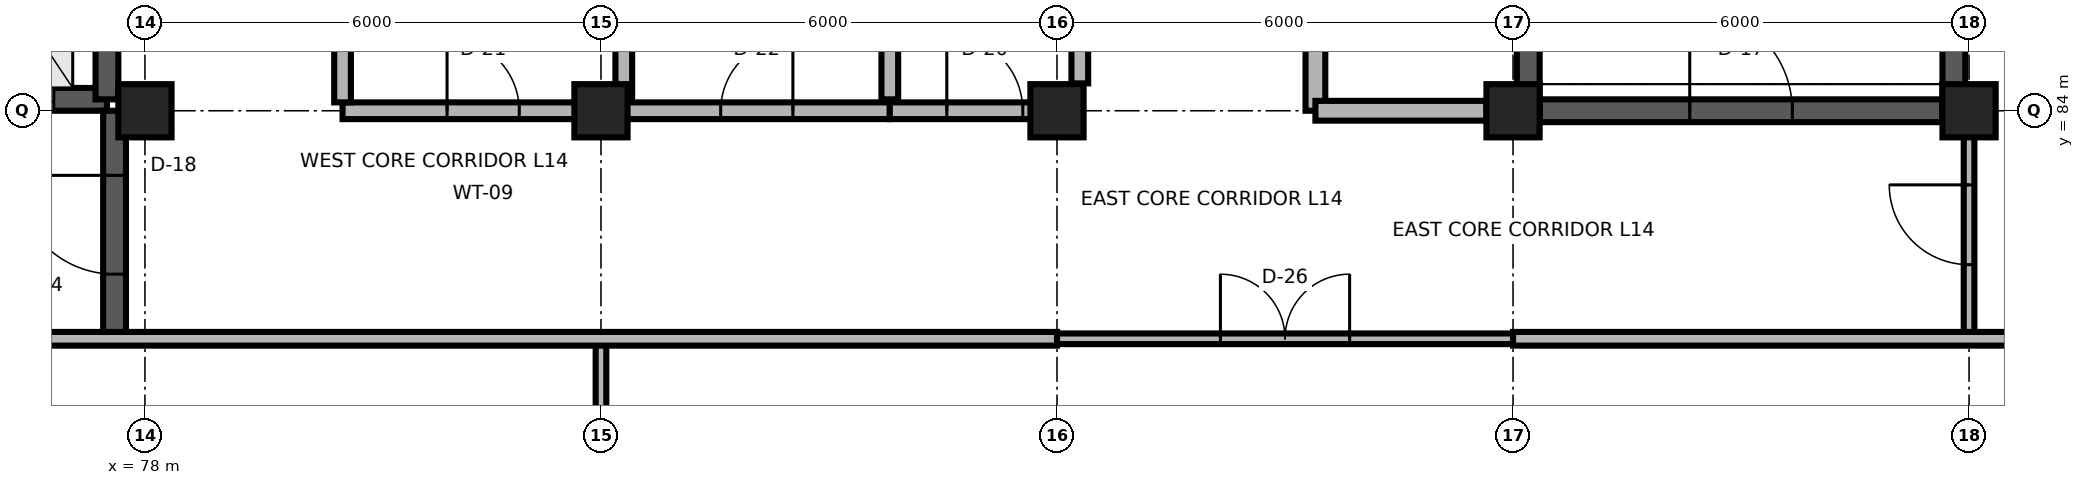
"""IFC4 building model, lengths in metres.
Left out: names, types, materials, properties, quantities, classifications, styles, units other than length and angle.
Written with IfcOpenShell. Run it as: python <this file> out.ifc"""

import sys

from ifc_helpers import new_model, si_unit, direction, frame, frame_2d, origin, origin_2d, place, context, subcontext, project, spatial, rectangle, extrude, element, fill, save


model = new_model("IFC4")
c1 = context("Model", 3, precision=1e-05, world=origin(), true_north=direction((0.0, 1.0)))
c2 = subcontext(c1, "Body", "Model", "MODEL_VIEW")
j1 = project(units=[si_unit("LENGTHUNIT", "METRE"), si_unit("PLANEANGLEUNIT", "RADIAN")], contexts=[c1])
p1 = place(None, origin())
s1 = spatial("IfcSite", under=j1, at=p1, CompositionType="ELEMENT")
p2 = place(p1, origin())
s2 = spatial("IfcBuilding", under=s1, at=p2, CompositionType="ELEMENT")
p3 = place(p2, frame((0.0, 0.0, 56.1)))
s3 = spatial("IfcBuildingStorey", under=s2, at=p3, CompositionType="ELEMENT", Elevation=56.1)
for number, where, z_axis, x_axis in (
    (1, (78.0, 84.0, 0.0), (0.0, 0.0, 1.0), (1.0, 0.0, 0.0)),
    (2, (84.0, 84.0, 0.0), (0.0, 0.0, 1.0), (1.0, 0.0, 0.0)),
    (3, (90.0, 84.0, 0.0), (0.0, 0.0, 1.0), (1.0, 0.0, 0.0)),
    (4, (96.0, 84.0, 0.0), (0.0, 0.0, 1.0), (1.0, 0.0, 0.0)),
    (5, (102.0, 84.0, 0.0), (0.0, 0.0, 1.0), (1.0, 0.0, 0.0)),
):
    element("IfcColumn", number, at=place(p3, frame(where, z_axis=z_axis, x_axis=x_axis)), inside=s3, PredefinedType="COLUMN", context=c2, shape_type="SweptSolid", body=[
        extrude(rectangle(XDim=0.7, YDim=0.7, at=origin_2d()), origin(), (0.0, 0.0, 1.0), 3.9),
    ])
p4 = place(p3, frame((96.35, 84.0, 0.0), z_axis=(0.0, 0.0, 1.0), x_axis=(1.0, 0.0, 0.0)))
e6 = element("IfcWall", 6, at=p4, inside=s3, PredefinedType="SHEAR", context=c2, shape_type="SweptSolid", body=[
    extrude(rectangle(XDim=5.3, YDim=0.3, at=frame_2d((2.65, 0.0))), origin(), (0.0, 0.0, 1.0), 3.66),
])
p5 = place(p4, frame((1.975, 0.0, 0.0)))
e7 = element("IfcOpeningElement", 7, at=p5, cuts=e6, PredefinedType="OPENING", context=c2, shape_type="SweptSolid", body=[
    extrude(rectangle(XDim=1.35, YDim=2.2, at=frame_2d((0.675, 1.1))), frame((0.0, 0.165, 0.0), z_axis=(0.0, -1.0, 0.0), x_axis=(1.0, 0.0, 0.0)), (0.0, 0.0, 1.0), 0.33),
])
for number, where, z_axis, x_axis in (
    (8, (96.2, 84.0, 0.0), (0.0, 0.0, 1.0), (0.0, 1.0, 0.0)),
    (9, (101.8, 84.0, 0.0), (0.0, 0.0, 1.0), (0.0, 1.0, 0.0)),
):
    element("IfcWall", number, at=place(p3, frame(where, z_axis=z_axis, x_axis=x_axis)), inside=s3, PredefinedType="SHEAR", context=c2, shape_type="SweptSolid", body=[
        extrude(rectangle(XDim=11.8, YDim=0.3, at=frame_2d((5.9, 0.0))), origin(), (0.0, 0.0, 1.0), 3.74),
    ])
p6 = place(p3, frame((75.0, 84.15, 0.0), z_axis=(0.0, 0.0, 1.0), x_axis=(1.0, 0.0, 0.0)))
e10 = element("IfcWall", 10, at=p6, inside=s3, PredefinedType="SHEAR", context=c2, shape_type="SweptSolid", body=[
    extrude(rectangle(XDim=2.5, YDim=0.3, at=frame_2d((1.25, 0.0))), origin(), (0.0, 0.0, 1.0), 3.74),
])
p7 = place(p6, frame((0.7, 0.0, 0.0)))
e11 = element("IfcOpeningElement", 11, at=p7, cuts=e10, PredefinedType="OPENING", context=c2, shape_type="SweptSolid", body=[
    extrude(rectangle(XDim=1.1, YDim=2.1, at=frame_2d((0.55, 1.05))), frame((0.0, 0.165, 0.0), z_axis=(0.0, -1.0, 0.0), x_axis=(1.0, 0.0, 0.0)), (0.0, 0.0, 1.0), 0.33),
])
p8 = place(p3, frame((77.5, 84.15, 0.0), z_axis=(0.0, 0.0, 1.0), x_axis=(0.0, 1.0, 0.0)))
e12 = element("IfcWall", 12, at=p8, inside=s3, PredefinedType="SHEAR", context=c2, shape_type="SweptSolid", body=[
    extrude(rectangle(XDim=3.4, YDim=0.3, at=frame_2d((1.7, 0.0))), origin(), (0.0, 0.0, 1.0), 3.74),
])
p9 = place(p3, frame((93.4, 84.0, 0.0), z_axis=(0.0, 0.0, 1.0), x_axis=(0.0, 1.0, 0.0)))
e13 = element("IfcWall", 13, at=p9, inside=s3, PredefinedType="PARTITIONING", context=c2, shape_type="SweptSolid", body=[
    extrude(rectangle(XDim=11.96, YDim=0.26, at=frame_2d((5.98, 0.0))), origin(), (0.0, 0.0, 1.0), 3.74),
])
p10 = place(p9, frame((3.425, 0.0, 0.0)))
e14 = element("IfcOpeningElement", 14, at=p10, cuts=e13, PredefinedType="OPENING", context=c2, shape_type="SweptSolid", body=[
    extrude(rectangle(XDim=1.15, YDim=2.2, at=frame_2d((0.575, 1.1))), frame((0.0, 0.145, 0.0), z_axis=(0.0, -1.0, 0.0), x_axis=(1.0, 0.0, 0.0)), (0.0, 0.0, 1.0), 0.29),
])
p11 = place(p3, frame((93.4, 84.0, 0.0), z_axis=(0.0, 0.0, 1.0), x_axis=(1.0, 0.0, 0.0)))
e15 = element("IfcWall", 15, at=p11, inside=s3, PredefinedType="PARTITIONING", context=c2, shape_type="SweptSolid", body=[
    extrude(rectangle(XDim=2.25, YDim=0.26, at=frame_2d((1.125, 0.0))), origin(), (0.0, 0.0, 1.0), 3.449),
])
p12 = place(p3, frame((77.6, 81.0, 0.0), z_axis=(0.0, 0.0, 1.0), x_axis=(0.0, 1.0, 0.0)))
e16 = element("IfcWall", 16, at=p12, inside=s3, PredefinedType="SHEAR", context=c2, shape_type="SweptSolid", body=[
    extrude(rectangle(XDim=3.0, YDim=0.3, at=frame_2d((1.5, 0.0))), origin(), (0.0, 0.0, 1.0), 3.74),
])
p13 = place(p12, frame((0.85, 0.0, 0.0)))
e17 = element("IfcOpeningElement", 17, at=p13, cuts=e16, PredefinedType="OPENING", context=c2, shape_type="SweptSolid", body=[
    extrude(rectangle(XDim=1.3, YDim=2.2, at=frame_2d((0.65, 1.1))), frame((0.0, 0.165, 0.0), z_axis=(0.0, -1.0, 0.0), x_axis=(1.0, 0.0, 0.0)), (0.0, 0.0, 1.0), 0.33),
])
p14 = place(p3, frame((80.6, 84.0, 0.0), z_axis=(0.0, 0.0, 1.0), x_axis=(1.0, 0.0, 0.0)))
e18 = element("IfcWall", 18, at=p14, inside=s3, PredefinedType="PARTITIONING", context=c2, shape_type="SweptSolid", body=[
    extrude(rectangle(XDim=3.7, YDim=0.22, at=frame_2d((1.85, 0.0))), origin(), (0.0, 0.0, 1.0), 3.449),
])
p15 = place(p14, frame((1.375, 0.0, 0.0)))
e19 = element("IfcOpeningElement", 19, at=p15, cuts=e18, PredefinedType="OPENING", context=c2, shape_type="SweptSolid", body=[
    extrude(rectangle(XDim=0.95, YDim=2.15, at=frame_2d((0.475, 1.075))), frame((0.0, 0.125, 0.0), z_axis=(0.0, -1.0, 0.0), x_axis=(1.0, 0.0, 0.0)), (0.0, 0.0, 1.0), 0.25),
])
p16 = place(p3, frame((84.3, 84.0, 0.0), z_axis=(0.0, 0.0, 1.0), x_axis=(1.0, 0.0, 0.0)))
e20 = element("IfcWall", 20, at=p16, inside=s3, PredefinedType="PARTITIONING", context=c2, shape_type="SweptSolid", body=[
    extrude(rectangle(XDim=3.5, YDim=0.22, at=frame_2d((1.75, 0.0))), origin(), (0.0, 0.0, 1.0), 3.449),
])
p17 = place(p16, frame((1.275, 0.0, 0.0)))
e21 = element("IfcOpeningElement", 21, at=p17, cuts=e20, PredefinedType="OPENING", context=c2, shape_type="SweptSolid", body=[
    extrude(rectangle(XDim=0.95, YDim=2.1, at=frame_2d((0.475, 1.05))), frame((0.0, 0.125, 0.0), z_axis=(0.0, -1.0, 0.0), x_axis=(1.0, 0.0, 0.0)), (0.0, 0.0, 1.0), 0.25),
])
p18 = place(p3, frame((87.8, 84.0, 0.0), z_axis=(0.0, 0.0, 1.0), x_axis=(1.0, 0.0, 0.0)))
e22 = element("IfcWall", 22, at=p18, inside=s3, PredefinedType="PARTITIONING", context=c2, shape_type="SweptSolid", body=[
    extrude(rectangle(XDim=2.5, YDim=0.22, at=frame_2d((1.25, 0.0))), origin(), (0.0, 0.0, 1.0), 3.449),
])
p19 = place(p18, frame((0.75, 0.0, 0.0)))
e23 = element("IfcOpeningElement", 23, at=p19, cuts=e22, PredefinedType="OPENING", context=c2, shape_type="SweptSolid", body=[
    extrude(rectangle(XDim=1.0, YDim=2.15, at=frame_2d((0.5, 1.075))), frame((0.0, 0.125, 0.0), z_axis=(0.0, -1.0, 0.0), x_axis=(1.0, 0.0, 0.0)), (0.0, 0.0, 1.0), 0.25),
])
for number, where, z_axis, x_axis in (
    (24, (84.3, 84.15, 0.0), (0.0, 0.0, 1.0), (0.0, 1.0, 0.0)),
    (25, (87.8, 84.15, 0.0), (0.0, 0.0, 1.0), (0.0, 1.0, 0.0)),
):
    element("IfcWall", number, at=place(p3, frame(where, z_axis=z_axis, x_axis=x_axis)), inside=s3, PredefinedType="PARTITIONING", context=c2, shape_type="SweptSolid", body=[
        extrude(rectangle(XDim=5.0, YDim=0.22, at=frame_2d((2.5, 0.0))), origin(), (0.0, 0.0, 1.0), 3.74),
    ])
p20 = place(p3, frame((90.0, 81.0, 0.0), z_axis=(0.0, 0.0, 1.0), x_axis=(1.0, 0.0, 0.0)))
e26 = element("IfcWall", 26, at=p20, inside=s3, PredefinedType="PARTITIONING", context=c2, shape_type="SweptSolid", body=[
    extrude(rectangle(XDim=6.0, YDim=0.14, at=frame_2d((3.0, 0.0))), origin(), (0.0, 0.0, 1.0), 3.74),
])
p21 = place(p20, frame((2.15, 0.0, 0.0)))
e27 = element("IfcOpeningElement", 27, at=p21, cuts=e26, PredefinedType="OPENING", context=c2, shape_type="SweptSolid", body=[
    extrude(rectangle(XDim=1.7, YDim=2.45, at=frame_2d((0.85, 1.225))), frame((0.0, 0.085, 0.0), z_axis=(0.0, -1.0, 0.0), x_axis=(1.0, 0.0, 0.0)), (0.0, 0.0, 1.0), 0.17),
])
p22 = place(p3, frame((102.0, 81.05, 0.0), z_axis=(0.0, 0.0, 1.0), x_axis=(0.0, 1.0, 0.0)))
e28 = element("IfcWall", 28, at=p22, inside=s3, PredefinedType="PARTITIONING", context=c2, shape_type="SweptSolid", body=[
    extrude(rectangle(XDim=2.9, YDim=0.14, at=frame_2d((1.45, 0.0))), origin(), (0.0, 0.0, 1.0), 3.449),
])
p23 = place(p22, frame((0.925, 0.0, 0.0)))
e29 = element("IfcOpeningElement", 29, at=p23, cuts=e28, PredefinedType="OPENING", context=c2, shape_type="SweptSolid", body=[
    extrude(rectangle(XDim=1.05, YDim=2.25, at=frame_2d((0.525, 1.125))), frame((0.0, 0.085, 0.0), z_axis=(0.0, -1.0, 0.0), x_axis=(1.0, 0.0, 0.0)), (0.0, 0.0, 1.0), 0.17),
])
p24 = place(p3, frame((84.0, 78.35, 0.0), z_axis=(0.0, 0.0, 1.0), x_axis=(0.0, 1.0, 0.0)))
e30 = element("IfcWall", 30, at=p24, inside=s3, PredefinedType="PARTITIONING", context=c2, shape_type="SweptSolid", body=[
    extrude(rectangle(XDim=2.65, YDim=0.14, at=frame_2d((1.325, 0.0))), origin(), (0.0, 0.0, 1.0), 3.449),
])
p25 = place(p3, frame((80.6, 84.11, 0.0), z_axis=(0.0, 0.0, 1.0), x_axis=(0.0, 1.0, 0.0)))
e31 = element("IfcWall", 31, at=p25, inside=s3, PredefinedType="PARTITIONING", context=c2, shape_type="SweptSolid", body=[
    extrude(rectangle(XDim=4.98, YDim=0.22, at=frame_2d((2.49, 0.0))), origin(), (0.0, 0.0, 1.0), 3.74),
])
p26 = place(p3, frame((90.3, 84.36, 0.0), z_axis=(0.0, 0.0, 1.0), x_axis=(0.0, 1.0, 0.0)))
e32 = element("IfcWall", 32, at=p26, inside=s3, PredefinedType="PARTITIONING", context=c2, shape_type="SweptSolid", body=[
    extrude(rectangle(XDim=4.73, YDim=0.22, at=frame_2d((2.365, 0.0))), origin(), (0.0, 0.0, 1.0), 3.74),
])
p27 = place(p3, frame((72.0, 81.0, 0.0), z_axis=(0.0, 0.0, 1.0), x_axis=(1.0, 0.0, 0.0)))
e33 = element("IfcWall", 33, at=p27, inside=s3, PredefinedType="PARTITIONING", context=c2, shape_type="SweptSolid", body=[
    extrude(rectangle(XDim=18.0, YDim=0.18, at=frame_2d((9.0, 0.0))), origin(), (0.0, 0.0, 1.0), 3.74),
])
p28 = place(p3, frame((96.0, 81.0, 0.0), z_axis=(0.0, 0.0, 1.0), x_axis=(1.0, 0.0, 0.0)))
e34 = element("IfcWall", 34, at=p28, inside=s3, PredefinedType="PARTITIONING", context=c2, shape_type="SweptSolid", body=[
    extrude(rectangle(XDim=10.3, YDim=0.18, at=frame_2d((5.15, 0.0))), origin(), (0.0, 0.0, 1.0), 3.74),
])
p29 = place(p5, origin())
e35 = element("IfcDoor", 35, at=p29, inside=s3, OperationType="SINGLE_SWING_LEFT", PredefinedType="DOOR", context=c2, shape_type="SweptSolid", body=[
    extrude(rectangle(XDim=1.35, YDim=2.2, at=frame_2d((0.675, 1.1))), frame((0.0, 0.025, 0.0), z_axis=(0.0, -1.0, 0.0), x_axis=(1.0, 0.0, 0.0)), (0.0, 0.0, 1.0), 0.05),
])
fill(e7, e35)
p30 = place(p7, origin())
e36 = element("IfcDoor", 36, at=p30, inside=s3, OperationType="DOUBLE_DOOR_SLIDING", PredefinedType="DOOR", context=c2, shape_type="SweptSolid", body=[
    extrude(rectangle(XDim=1.1, YDim=2.1, at=frame_2d((0.55, 1.05))), frame((0.0, 0.025, 0.0), z_axis=(0.0, -1.0, 0.0), x_axis=(1.0, 0.0, 0.0)), (0.0, 0.0, 1.0), 0.05),
])
fill(e11, e36)
p31 = place(p13, origin())
e37 = element("IfcDoor", 37, at=p31, inside=s3, OperationType="SINGLE_SWING_RIGHT", PredefinedType="DOOR", context=c2, shape_type="SweptSolid", body=[
    extrude(rectangle(XDim=1.3, YDim=2.2, at=frame_2d((0.65, 1.1))), frame((0.0, 0.025, 0.0), z_axis=(0.0, -1.0, 0.0), x_axis=(1.0, 0.0, 0.0)), (0.0, 0.0, 1.0), 0.05),
])
fill(e17, e37)
p32 = place(p15, origin())
e38 = element("IfcDoor", 38, at=p32, inside=s3, OperationType="SINGLE_SWING_LEFT", PredefinedType="DOOR", context=c2, shape_type="SweptSolid", body=[
    extrude(rectangle(XDim=0.95, YDim=2.15, at=frame_2d((0.475, 1.075))), frame((0.0, 0.025, 0.0), z_axis=(0.0, -1.0, 0.0), x_axis=(1.0, 0.0, 0.0)), (0.0, 0.0, 1.0), 0.05),
])
fill(e19, e38)
p33 = place(p17, origin())
e39 = element("IfcDoor", 39, at=p33, inside=s3, OperationType="SINGLE_SWING_RIGHT", PredefinedType="DOOR", context=c2, shape_type="SweptSolid", body=[
    extrude(rectangle(XDim=0.95, YDim=2.1, at=frame_2d((0.475, 1.05))), frame((0.0, 0.025, 0.0), z_axis=(0.0, -1.0, 0.0), x_axis=(1.0, 0.0, 0.0)), (0.0, 0.0, 1.0), 0.05),
])
fill(e21, e39)
p34 = place(p19, origin())
e40 = element("IfcDoor", 40, at=p34, inside=s3, OperationType="SINGLE_SWING_LEFT", PredefinedType="DOOR", context=c2, shape_type="SweptSolid", body=[
    extrude(rectangle(XDim=1.0, YDim=2.15, at=frame_2d((0.5, 1.075))), frame((0.0, 0.025, 0.0), z_axis=(0.0, -1.0, 0.0), x_axis=(1.0, 0.0, 0.0)), (0.0, 0.0, 1.0), 0.05),
])
fill(e23, e40)
p35 = place(p21, origin())
e41 = element("IfcDoor", 41, at=p35, inside=s3, OperationType="DOUBLE_DOOR_SINGLE_SWING", PredefinedType="DOOR", context=c2, shape_type="SweptSolid", body=[
    extrude(rectangle(XDim=1.7, YDim=2.45, at=frame_2d((0.85, 1.225))), frame((0.0, 0.025, 0.0), z_axis=(0.0, -1.0, 0.0), x_axis=(1.0, 0.0, 0.0)), (0.0, 0.0, 1.0), 0.05),
])
fill(e27, e41)
p36 = place(p23, origin())
e42 = element("IfcDoor", 42, at=p36, inside=s3, OperationType="SINGLE_SWING_RIGHT", PredefinedType="DOOR", context=c2, shape_type="SweptSolid", body=[
    extrude(rectangle(XDim=1.05, YDim=2.25, at=frame_2d((0.525, 1.125))), frame((0.0, 0.025, 0.0), z_axis=(0.0, -1.0, 0.0), x_axis=(1.0, 0.0, 0.0)), (0.0, 0.0, 1.0), 0.05),
])
fill(e29, e42)
save(model, sys.argv[1])
